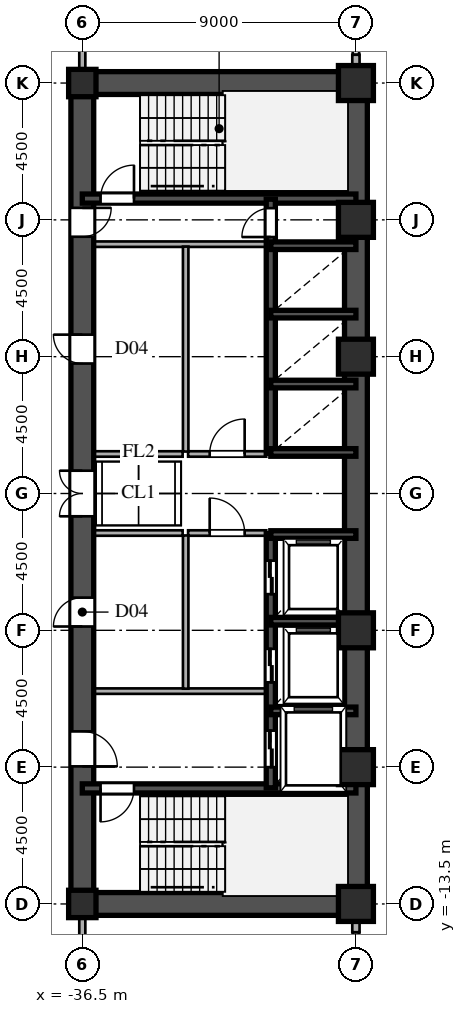
"""IFC4 building model, lengths in metres.
Left out: names, types, materials, properties, quantities, classifications, styles, units other than length and angle.
Written with IfcOpenShell. Run it as: python <this file> out.ifc"""

import sys

from ifc_helpers import new_model, si_unit, direction, frame, frame_2d, origin, origin_2d, place, context, subcontext, project, spatial, rectangle, hollow_rectangle, i_section, extrude, source, transform, mapped, element, fill, save


model = new_model("IFC4")
c1 = context("Model", 3, precision=1e-05, world=origin(), true_north=direction((0.0, 1.0)))
c2 = subcontext(c1, "Body", "Model", "MODEL_VIEW")
j1 = project(units=[si_unit("LENGTHUNIT", "METRE"), si_unit("PLANEANGLEUNIT", "RADIAN")], contexts=[c1])
p1 = place(None, origin())
s1 = spatial("IfcSite", under=j1, at=p1, CompositionType="ELEMENT")
p2 = place(p1, origin())
s2 = spatial("IfcBuilding", under=s1, at=p2, CompositionType="ELEMENT")
p3 = place(p2, frame((0.0, 0.0, 22.5)))
s3 = spatial("IfcBuildingStorey", under=s2, at=p3, CompositionType="ELEMENT", Elevation=22.5)
m1 = source(origin(), c2, "Body", "SweptSolid", [
    extrude(hollow_rectangle(XDim=1.15, YDim=1.15, WallThickness=0.048, at=origin_2d()), origin(), (0.0, 0.0, 1.0), 3.6),
])
for number, where, z_axis, x_axis in (
    (1, (-27.5, -13.5, 0.0), (0.0, 0.0, 1.0), (1.0, 0.0, 0.0)),
    (2, (-27.5, -9.0, 0.0), (0.0, 0.0, 1.0), (1.0, 0.0, 0.0)),
    (3, (-27.5, -4.5, 0.0), (0.0, 0.0, 1.0), (1.0, 0.0, 0.0)),
    (4, (-27.5, 4.5, 0.0), (0.0, 0.0, 1.0), (1.0, 0.0, 0.0)),
    (5, (-27.5, 9.0, 0.0), (0.0, 0.0, 1.0), (1.0, 0.0, 0.0)),
    (6, (-27.5, 13.5, 0.0), (0.0, 0.0, 1.0), (1.0, 0.0, 0.0)),
):
    element("IfcColumn", number, at=place(p3, frame(where, z_axis=z_axis, x_axis=x_axis)), inside=s3, PredefinedType="COLUMN", context=c2, shape_type="MappedRepresentation", body=[
        mapped(m1, transform((0.0, 0.0, 0.0), scale=1.0)),
    ])
m2 = source(origin(), c2, "Body", "SweptSolid", [
    extrude(i_section(OverallWidth=0.9, OverallDepth=0.9, WebThickness=0.036, FlangeThickness=0.055, at=origin_2d()), origin(), (0.0, 0.0, 1.0), 3.6),
])
for number, where, z_axis, x_axis in (
    (7, (-36.5, -13.5, 0.0), (0.0, 0.0, 1.0), (1.0, 0.0, 0.0)),
    (8, (-36.5, 13.5, 0.0), (0.0, 0.0, 1.0), (1.0, 0.0, 0.0)),
):
    element("IfcColumn", number, at=place(p3, frame(where, z_axis=z_axis, x_axis=x_axis)), inside=s3, PredefinedType="COLUMN", context=c2, shape_type="MappedRepresentation", body=[
        mapped(m2, transform((0.0, 0.0, 0.0), scale=1.0)),
    ])
for number, where, z_axis, x_axis in (
    (9, (-27.5, -14.43, 0.0), (0.0, 0.0, 1.0), (0.0, 1.0, 0.0)),
    (10, (-27.5, 13.88, 0.0), (0.0, 0.0, 1.0), (0.0, 1.0, 0.0)),
):
    element("IfcWall", number, at=place(p3, frame(where, z_axis=z_axis, x_axis=x_axis)), inside=s3, PredefinedType="SOLIDWALL", context=c2, shape_type="SweptSolid", body=[
        extrude(rectangle(XDim=0.55, YDim=0.24, at=frame_2d((0.275, 0.0))), origin(), (0.0, 0.0, 1.0), 2.88),
    ])
for number, where, z_axis, x_axis in (
    (11, (-27.5, -13.5, 0.0), (0.0, 0.0, 1.0), (0.0, 1.0, 0.0)),
    (12, (-27.5, 1.3, 0.0), (0.0, 0.0, 1.0), (0.0, 1.0, 0.0)),
):
    element("IfcWall", number, at=place(p3, frame(where, z_axis=z_axis, x_axis=x_axis)), inside=s3, PredefinedType="SHEAR", context=c2, shape_type="SweptSolid", body=[
        extrude(rectangle(XDim=12.2, YDim=0.75, at=frame_2d((6.1, 0.0))), origin(), (0.0, 0.0, 1.0), 3.38),
    ])
p4 = place(p3, frame((-27.5, -1.3, 0.0), z_axis=(0.0, 0.0, 1.0), x_axis=(0.0, 1.0, 0.0)))
e13 = element("IfcWall", 13, at=p4, inside=s3, PredefinedType="SHEAR", context=c2, shape_type="SweptSolid", body=[
    extrude(rectangle(XDim=2.6, YDim=0.75, at=frame_2d((1.3, 0.0))), origin(), (0.0, 0.0, 1.0), 3.38),
])
for number, where, z_axis, x_axis in (
    (14, (-36.5, -13.5, 0.0), (0.0, 0.0, 1.0), (1.0, 0.0, 0.0)),
    (15, (-36.5, 13.5, 0.0), (0.0, 0.0, 1.0), (1.0, 0.0, 0.0)),
):
    element("IfcWall", number, at=place(p3, frame(where, z_axis=z_axis, x_axis=x_axis)), inside=s3, PredefinedType="SHEAR", context=c2, shape_type="SweptSolid", body=[
        extrude(rectangle(XDim=9.0, YDim=0.75, at=frame_2d((4.5, 0.0))), origin(), (0.0, 0.0, 1.0), 3.38),
    ])
p5 = place(p3, frame((-36.5, -13.65, 0.0), z_axis=(0.0, 0.0, 1.0), x_axis=(0.0, 1.0, 0.0)))
e16 = element("IfcWall", 16, at=p5, inside=s3, PredefinedType="SHEAR", context=c2, shape_type="SweptSolid", body=[
    extrude(rectangle(XDim=7.15, YDim=0.75, at=frame_2d((3.575, 0.0))), origin(), (0.0, 0.0, 1.0), 3.38),
])
p6 = place(p5, frame((4.675, 0.0, 0.0)))
e17 = element("IfcOpeningElement", 17, at=p6, cuts=e16, PredefinedType="OPENING", context=c2, shape_type="SweptSolid", body=[
    extrude(rectangle(XDim=1.15, YDim=2.2, at=frame_2d((0.575, 1.1))), frame((0.0, 0.385, 0.0), z_axis=(0.0, -1.0, 0.0), x_axis=(1.0, 0.0, 0.0)), (0.0, 0.0, 1.0), 0.77),
])
p7 = place(p3, frame((-36.5, -1.3, 0.0), z_axis=(0.0, 0.0, 1.0), x_axis=(0.0, 1.0, 0.0)))
e18 = element("IfcWall", 18, at=p7, inside=s3, PredefinedType="SHEAR", context=c2, shape_type="SweptSolid", body=[
    extrude(rectangle(XDim=2.6, YDim=0.75, at=frame_2d((1.3, 0.0))), origin(), (0.0, 0.0, 1.0), 3.38),
])
p8 = place(p7, frame((0.55, 0.0, 0.0)))
e19 = element("IfcOpeningElement", 19, at=p8, cuts=e18, PredefinedType="OPENING", context=c2, shape_type="SweptSolid", body=[
    extrude(rectangle(XDim=1.5, YDim=2.3, at=frame_2d((0.75, 1.15))), frame((0.0, 0.385, 0.0), z_axis=(0.0, -1.0, 0.0), x_axis=(1.0, 0.0, 0.0)), (0.0, 0.0, 1.0), 0.77),
])
p9 = place(p3, frame((-36.5, 8.2, 0.0), z_axis=(0.0, 0.0, 1.0), x_axis=(0.0, 1.0, 0.0)))
e20 = element("IfcWall", 20, at=p9, inside=s3, PredefinedType="SHEAR", context=c2, shape_type="SweptSolid", body=[
    extrude(rectangle(XDim=5.45, YDim=0.75, at=frame_2d((2.725, 0.0))), origin(), (0.0, 0.0, 1.0), 3.38),
])
p10 = place(p9, frame((0.245, 0.0, 0.0)))
e21 = element("IfcOpeningElement", 21, at=p10, cuts=e20, PredefinedType="OPENING", context=c2, shape_type="SweptSolid", body=[
    extrude(rectangle(XDim=0.95, YDim=2.15, at=frame_2d((0.475, 1.075))), frame((0.0, 0.385, 0.0), z_axis=(0.0, -1.0, 0.0), x_axis=(1.0, 0.0, 0.0)), (0.0, 0.0, 1.0), 0.77),
])
p11 = place(p3, frame((-36.5, -6.5, 0.0), z_axis=(0.0, 0.0, 1.0), x_axis=(0.0, 1.0, 0.0)))
e22 = element("IfcWall", 22, at=p11, inside=s3, PredefinedType="SHEAR", context=c2, shape_type="SweptSolid", body=[
    extrude(rectangle(XDim=5.2, YDim=0.75, at=frame_2d((2.6, 0.0))), origin(), (0.0, 0.0, 1.0), 3.38),
])
p12 = place(p11, frame((2.125, 0.0, 0.0)))
e23 = element("IfcOpeningElement", 23, at=p12, cuts=e22, PredefinedType="OPENING", context=c2, shape_type="SweptSolid", body=[
    extrude(rectangle(XDim=0.95, YDim=2.15, at=frame_2d((0.475, 1.075))), frame((0.0, 0.385, 0.0), z_axis=(0.0, -1.0, 0.0), x_axis=(1.0, 0.0, 0.0)), (0.0, 0.0, 1.0), 0.77),
])
p13 = place(p3, frame((-36.5, 1.3, 0.0), z_axis=(0.0, 0.0, 1.0), x_axis=(0.0, 1.0, 0.0)))
e24 = element("IfcWall", 24, at=p13, inside=s3, PredefinedType="SHEAR", context=c2, shape_type="SweptSolid", body=[
    extrude(rectangle(XDim=6.9, YDim=0.75, at=frame_2d((3.45, 0.0))), origin(), (0.0, 0.0, 1.0), 3.38),
])
p14 = place(p13, frame((2.975, 0.0, 0.0)))
e25 = element("IfcOpeningElement", 25, at=p14, cuts=e24, PredefinedType="OPENING", context=c2, shape_type="SweptSolid", body=[
    extrude(rectangle(XDim=0.95, YDim=2.15, at=frame_2d((0.475, 1.075))), frame((0.0, 0.385, 0.0), z_axis=(0.0, -1.0, 0.0), x_axis=(1.0, 0.0, 0.0)), (0.0, 0.0, 1.0), 0.77),
])
p15 = place(p3, frame((-36.5, -9.7, 0.0), z_axis=(0.0, 0.0, 1.0), x_axis=(1.0, 0.0, 0.0)))
e26 = element("IfcWall", 26, at=p15, inside=s3, PredefinedType="SHEAR", context=c2, shape_type="SweptSolid", body=[
    extrude(rectangle(XDim=9.0, YDim=0.3, at=frame_2d((4.5, 0.0))), origin(), (0.0, 0.0, 1.0), 3.38),
])
p16 = place(p15, frame((0.6, 0.0, 0.0)))
e27 = element("IfcOpeningElement", 27, at=p16, cuts=e26, PredefinedType="OPENING", context=c2, shape_type="SweptSolid", body=[
    extrude(rectangle(XDim=1.1, YDim=2.2, at=frame_2d((0.55, 1.1))), frame((0.0, 0.16, 0.0), z_axis=(0.0, -1.0, 0.0), x_axis=(1.0, 0.0, 0.0)), (0.0, 0.0, 1.0), 0.32),
])
p17 = place(p3, frame((-36.5, 9.7, 0.0), z_axis=(0.0, 0.0, 1.0), x_axis=(1.0, 0.0, 0.0)))
e28 = element("IfcWall", 28, at=p17, inside=s3, PredefinedType="SHEAR", context=c2, shape_type="SweptSolid", body=[
    extrude(rectangle(XDim=9.0, YDim=0.3, at=frame_2d((4.5, 0.0))), origin(), (0.0, 0.0, 1.0), 3.38),
])
p18 = place(p17, frame((0.6, 0.0, 0.0)))
e29 = element("IfcOpeningElement", 29, at=p18, cuts=e28, PredefinedType="OPENING", context=c2, shape_type="SweptSolid", body=[
    extrude(rectangle(XDim=1.1, YDim=2.2, at=frame_2d((0.55, 1.1))), frame((0.0, 0.16, 0.0), z_axis=(0.0, -1.0, 0.0), x_axis=(1.0, 0.0, 0.0)), (0.0, 0.0, 1.0), 0.32),
])
for number, where, z_axis, x_axis in (
    (30, (-30.3, -7.15, 0.0), (0.0, 0.0, 1.0), (1.0, 0.0, 0.0)),
    (31, (-30.3, -4.2, 0.0), (0.0, 0.0, 1.0), (1.0, 0.0, 0.0)),
    (32, (-30.3, -1.35, 0.0), (0.0, 0.0, 1.0), (1.0, 0.0, 0.0)),
    (33, (-30.3, 1.35, 0.0), (0.0, 0.0, 1.0), (1.0, 0.0, 0.0)),
    (34, (-30.3, 3.6, 0.0), (0.0, 0.0, 1.0), (1.0, 0.0, 0.0)),
    (35, (-30.3, 5.9, 0.0), (0.0, 0.0, 1.0), (1.0, 0.0, 0.0)),
    (36, (-30.3, 8.15, 0.0), (0.0, 0.0, 1.0), (1.0, 0.0, 0.0)),
):
    element("IfcWall", number, at=place(p3, frame(where, z_axis=z_axis, x_axis=x_axis)), inside=s3, PredefinedType="SHEAR", context=c2, shape_type="SweptSolid", body=[
        extrude(rectangle(XDim=2.8, YDim=0.25, at=frame_2d((1.4, 0.0))), origin(), (0.0, 0.0, 1.0), 3.38),
    ])
p19 = place(p3, frame((-30.3, -9.68, 0.0), z_axis=(0.0, 0.0, 1.0), x_axis=(0.0, 1.0, 0.0)))
e37 = element("IfcWall", 37, at=p19, inside=s3, PredefinedType="SHEAR", context=c2, shape_type="SweptSolid", body=[
    extrude(rectangle(XDim=2.56, YDim=0.3, at=frame_2d((1.28, 0.0))), origin(), (0.0, 0.0, 1.0), 3.38),
])
p20 = place(p19, frame((0.68, 0.0, 0.0)))
e38 = element("IfcOpeningElement", 38, at=p20, cuts=e37, PredefinedType="OPENING", context=c2, shape_type="SweptSolid", body=[
    extrude(rectangle(XDim=1.2, YDim=2.25, at=frame_2d((0.6, 1.125))), frame((0.0, 0.16, 0.0), z_axis=(0.0, -1.0, 0.0), x_axis=(1.0, 0.0, 0.0)), (0.0, 0.0, 1.0), 0.32),
])
p21 = place(p3, frame((-30.3, -7.12, 0.0), z_axis=(0.0, 0.0, 1.0), x_axis=(0.0, 1.0, 0.0)))
e39 = element("IfcWall", 39, at=p21, inside=s3, PredefinedType="SHEAR", context=c2, shape_type="SweptSolid", body=[
    extrude(rectangle(XDim=2.92, YDim=0.3, at=frame_2d((1.46, 0.0))), origin(), (0.0, 0.0, 1.0), 3.38),
])
p22 = place(p21, frame((0.91, 0.0, 0.0)))
e40 = element("IfcOpeningElement", 40, at=p22, cuts=e39, PredefinedType="OPENING", context=c2, shape_type="SweptSolid", body=[
    extrude(rectangle(XDim=1.1, YDim=2.2, at=frame_2d((0.55, 1.1))), frame((0.0, 0.16, 0.0), z_axis=(0.0, -1.0, 0.0), x_axis=(1.0, 0.0, 0.0)), (0.0, 0.0, 1.0), 0.32),
])
p23 = place(p3, frame((-30.3, -4.2, 0.0), z_axis=(0.0, 0.0, 1.0), x_axis=(0.0, 1.0, 0.0)))
e41 = element("IfcWall", 41, at=p23, inside=s3, PredefinedType="SHEAR", context=c2, shape_type="SweptSolid", body=[
    extrude(rectangle(XDim=2.88, YDim=0.3, at=frame_2d((1.44, 0.0))), origin(), (0.0, 0.0, 1.0), 3.38),
])
p24 = place(p23, frame((0.89, 0.0, 0.0)))
e42 = element("IfcOpeningElement", 42, at=p24, cuts=e41, PredefinedType="OPENING", context=c2, shape_type="SweptSolid", body=[
    extrude(rectangle(XDim=1.1, YDim=2.2, at=frame_2d((0.55, 1.1))), frame((0.0, 0.16, 0.0), z_axis=(0.0, -1.0, 0.0), x_axis=(1.0, 0.0, 0.0)), (0.0, 0.0, 1.0), 0.32),
])
p25 = place(p3, frame((-30.3, 1.32, 0.0), z_axis=(0.0, 0.0, 1.0), x_axis=(0.0, 1.0, 0.0)))
e43 = element("IfcWall", 43, at=p25, inside=s3, PredefinedType="SHEAR", context=c2, shape_type="SweptSolid", body=[
    extrude(rectangle(XDim=2.28, YDim=0.3, at=frame_2d((1.14, 0.0))), origin(), (0.0, 0.0, 1.0), 3.38),
])
p26 = place(p3, frame((-30.3, 3.6, 0.0), z_axis=(0.0, 0.0, 1.0), x_axis=(0.0, 1.0, 0.0)))
e44 = element("IfcWall", 44, at=p26, inside=s3, PredefinedType="SHEAR", context=c2, shape_type="SweptSolid", body=[
    extrude(rectangle(XDim=2.3, YDim=0.3, at=frame_2d((1.15, 0.0))), origin(), (0.0, 0.0, 1.0), 3.38),
])
p27 = place(p3, frame((-30.3, 5.9, 0.0), z_axis=(0.0, 0.0, 1.0), x_axis=(0.0, 1.0, 0.0)))
e45 = element("IfcWall", 45, at=p27, inside=s3, PredefinedType="SHEAR", context=c2, shape_type="SweptSolid", body=[
    extrude(rectangle(XDim=2.25, YDim=0.3, at=frame_2d((1.125, 0.0))), origin(), (0.0, 0.0, 1.0), 3.38),
])
p28 = place(p3, frame((-30.3, 8.15, 0.0), z_axis=(0.0, 0.0, 1.0), x_axis=(0.0, 1.0, 0.0)))
e46 = element("IfcWall", 46, at=p28, inside=s3, PredefinedType="SHEAR", context=c2, shape_type="SweptSolid", body=[
    extrude(rectangle(XDim=1.53, YDim=0.3, at=frame_2d((0.765, 0.0))), origin(), (0.0, 0.0, 1.0), 3.38),
])
p29 = place(p28, frame((0.285, 0.0, 0.0)))
e47 = element("IfcOpeningElement", 47, at=p29, cuts=e46, PredefinedType="OPENING", context=c2, shape_type="SweptSolid", body=[
    extrude(rectangle(XDim=0.95, YDim=2.15, at=frame_2d((0.475, 1.075))), frame((0.0, 0.16, 0.0), z_axis=(0.0, -1.0, 0.0), x_axis=(1.0, 0.0, 0.0)), (0.0, 0.0, 1.0), 0.32),
])
for number, where, z_axis, x_axis in (
    (48, (-36.15, -6.5, 0.0), (0.0, 0.0, 1.0), (1.0, 0.0, 0.0)),
    (49, (-36.15, 8.2, 0.0), (0.0, 0.0, 1.0), (1.0, 0.0, 0.0)),
):
    element("IfcWall", number, at=place(p3, frame(where, z_axis=z_axis, x_axis=x_axis)), inside=s3, PredefinedType="PARTITIONING", context=c2, shape_type="SweptSolid", body=[
        extrude(rectangle(XDim=5.7, YDim=0.18, at=frame_2d((2.85, 0.0))), origin(), (0.0, 0.0, 1.0), 3.38),
    ])
p30 = place(p3, frame((-33.1, -6.42, 0.0), z_axis=(0.0, 0.0, 1.0), x_axis=(0.0, 1.0, 0.0)))
e50 = element("IfcWall", 50, at=p30, inside=s3, PredefinedType="PARTITIONING", context=c2, shape_type="SweptSolid", body=[
    extrude(rectangle(XDim=5.04, YDim=0.18, at=frame_2d((2.52, 0.0))), origin(), (0.0, 0.0, 1.0), 3.38),
])
p31 = place(p3, frame((-33.1, 1.38, 0.0), z_axis=(0.0, 0.0, 1.0), x_axis=(0.0, 1.0, 0.0)))
e51 = element("IfcWall", 51, at=p31, inside=s3, PredefinedType="PARTITIONING", context=c2, shape_type="SweptSolid", body=[
    extrude(rectangle(XDim=6.74, YDim=0.18, at=frame_2d((3.37, 0.0))), origin(), (0.0, 0.0, 1.0), 3.38),
])
p32 = place(p3, frame((-33.02, -1.3, 0.0), z_axis=(0.0, 0.0, 1.0), x_axis=(1.0, 0.0, 0.0)))
e52 = element("IfcWall", 52, at=p32, inside=s3, PredefinedType="PARTITIONING", context=c2, shape_type="SweptSolid", body=[
    extrude(rectangle(XDim=2.57, YDim=0.18, at=frame_2d((1.285, 0.0))), origin(), (0.0, 0.0, 1.0), 3.38),
])
p33 = place(p32, frame((0.71, 0.0, 0.0)))
e53 = element("IfcOpeningElement", 53, at=p33, cuts=e52, PredefinedType="OPENING", context=c2, shape_type="SweptSolid", body=[
    extrude(rectangle(XDim=1.15, YDim=2.2, at=frame_2d((0.575, 1.1))), frame((0.0, 0.1, 0.0), z_axis=(0.0, -1.0, 0.0), x_axis=(1.0, 0.0, 0.0)), (0.0, 0.0, 1.0), 0.2),
])
p34 = place(p3, frame((-33.02, 1.3, 0.0), z_axis=(0.0, 0.0, 1.0), x_axis=(1.0, 0.0, 0.0)))
e54 = element("IfcWall", 54, at=p34, inside=s3, PredefinedType="PARTITIONING", context=c2, shape_type="SweptSolid", body=[
    extrude(rectangle(XDim=2.57, YDim=0.18, at=frame_2d((1.285, 0.0))), origin(), (0.0, 0.0, 1.0), 3.38),
])
p35 = place(p34, frame((0.71, 0.0, 0.0)))
e55 = element("IfcOpeningElement", 55, at=p35, cuts=e54, PredefinedType="OPENING", context=c2, shape_type="SweptSolid", body=[
    extrude(rectangle(XDim=1.15, YDim=2.2, at=frame_2d((0.575, 1.1))), frame((0.0, 0.1, 0.0), z_axis=(0.0, -1.0, 0.0), x_axis=(1.0, 0.0, 0.0)), (0.0, 0.0, 1.0), 0.2),
])
for number, where, z_axis, x_axis in (
    (56, (-36.15, -1.3, 0.0), (0.0, 0.0, 1.0), (1.0, 0.0, 0.0)),
    (57, (-36.15, 1.3, 0.0), (0.0, 0.0, 1.0), (1.0, 0.0, 0.0)),
):
    element("IfcWall", number, at=place(p3, frame(where, z_axis=z_axis, x_axis=x_axis)), inside=s3, PredefinedType="PARTITIONING", context=c2, shape_type="SweptSolid", body=[
        extrude(rectangle(XDim=2.95, YDim=0.18, at=frame_2d((1.475, 0.0))), origin(), (0.0, 0.0, 1.0), 3.38),
    ])
for number, where, z_axis, x_axis in (
    (58, (-36.5, -15.515, 0.0), (0.0, 0.0, 1.0), (0.0, 1.0, 0.0)),
    (59, (-36.5, 13.88, 0.0), (0.0, 0.0, 1.0), (0.0, 1.0, 0.0)),
):
    element("IfcWall", number, at=place(p3, frame(where, z_axis=z_axis, x_axis=x_axis)), inside=s3, PredefinedType="PARTITIONING", context=c2, shape_type="SweptSolid", body=[
        extrude(rectangle(XDim=1.635, YDim=0.2, at=frame_2d((0.817, 0.0))), origin(), (0.0, 0.0, 1.0), 2.68),
    ])
m3 = source(origin(), c2, "Body", "SweptSolid", [
    extrude(rectangle(XDim=1.15, YDim=2.2, at=frame_2d((0.575, 1.1))), frame((0.0, 0.025, 0.0), z_axis=(0.0, -1.0, 0.0), x_axis=(1.0, 0.0, 0.0)), (0.0, 0.0, 1.0), 0.05),
])
p36 = place(p6, frame((1.15, 0.0, 0.0), z_axis=(0.0, 0.0, 1.0), x_axis=(-1.0, 0.0, 0.0)))
e60 = element("IfcDoor", 60, at=p36, inside=s3, OperationType="SINGLE_SWING_LEFT", PredefinedType="DOOR", context=c2, shape_type="MappedRepresentation", body=[
    mapped(m3, transform((0.0, 0.0, 0.0), scale=1.0)),
])
fill(e17, e60)
m4 = source(origin(), c2, "Body", "SweptSolid", [
    extrude(rectangle(XDim=1.5, YDim=2.3, at=frame_2d((0.75, 1.15))), frame((0.0, 0.025, 0.0), z_axis=(0.0, -1.0, 0.0), x_axis=(1.0, 0.0, 0.0)), (0.0, 0.0, 1.0), 0.05),
])
p37 = place(p8, origin())
e61 = element("IfcDoor", 61, at=p37, inside=s3, OperationType="DOUBLE_SWING_LEFT", PredefinedType="DOOR", context=c2, shape_type="MappedRepresentation", body=[
    mapped(m4, transform((0.0, 0.0, 0.0), scale=1.0)),
])
fill(e19, e61)
m5 = source(origin(), c2, "Body", "SweptSolid", [
    extrude(rectangle(XDim=0.95, YDim=2.15, at=frame_2d((0.475, 1.075))), frame((0.0, 0.025, 0.0), z_axis=(0.0, -1.0, 0.0), x_axis=(1.0, 0.0, 0.0)), (0.0, 0.0, 1.0), 0.05),
])
p38 = place(p10, frame((0.95, 0.0, 0.0), z_axis=(0.0, 0.0, 1.0), x_axis=(-1.0, 0.0, 0.0)))
e62 = element("IfcDoor", 62, at=p38, inside=s3, OperationType="SINGLE_SWING_RIGHT", PredefinedType="DOOR", context=c2, shape_type="MappedRepresentation", body=[
    mapped(m5, transform((0.0, 0.0, 0.0), scale=1.0)),
])
fill(e21, e62)
p39 = place(p12, origin())
e63 = element("IfcDoor", 63, at=p39, inside=s3, OperationType="SINGLE_SWING_LEFT", PredefinedType="DOOR", context=c2, shape_type="MappedRepresentation", body=[
    mapped(m5, transform((0.0, 0.0, 0.0), scale=1.0)),
])
fill(e23, e63)
p40 = place(p14, origin())
e64 = element("IfcDoor", 64, at=p40, inside=s3, OperationType="SINGLE_SWING_RIGHT", PredefinedType="DOOR", context=c2, shape_type="MappedRepresentation", body=[
    mapped(m5, transform((0.0, 0.0, 0.0), scale=1.0)),
])
fill(e25, e64)
m6 = source(origin(), c2, "Body", "SweptSolid", [
    extrude(rectangle(XDim=1.1, YDim=2.2, at=frame_2d((0.55, 1.1))), frame((0.0, 0.025, 0.0), z_axis=(0.0, -1.0, 0.0), x_axis=(1.0, 0.0, 0.0)), (0.0, 0.0, 1.0), 0.05),
])
p41 = place(p16, frame((1.1, 0.0, 0.0), z_axis=(0.0, 0.0, 1.0), x_axis=(-1.0, 0.0, 0.0)))
e65 = element("IfcDoor", 65, at=p41, inside=s3, OperationType="SINGLE_SWING_LEFT", PredefinedType="DOOR", context=c2, shape_type="MappedRepresentation", body=[
    mapped(m6, transform((0.0, 0.0, 0.0), scale=1.0)),
])
fill(e27, e65)
p42 = place(p18, origin())
e66 = element("IfcDoor", 66, at=p42, inside=s3, OperationType="SINGLE_SWING_RIGHT", PredefinedType="DOOR", context=c2, shape_type="MappedRepresentation", body=[
    mapped(m6, transform((0.0, 0.0, 0.0), scale=1.0)),
])
fill(e29, e66)
m7 = source(origin(), c2, "Body", "SweptSolid", [
    extrude(rectangle(XDim=1.2, YDim=2.25, at=frame_2d((0.6, 1.125))), frame((0.0, 0.025, 0.0), z_axis=(0.0, -1.0, 0.0), x_axis=(1.0, 0.0, 0.0)), (0.0, 0.0, 1.0), 0.05),
])
p43 = place(p20, origin())
e67 = element("IfcDoor", 67, at=p43, inside=s3, OperationType="DOUBLE_DOOR_SLIDING", PredefinedType="DOOR", context=c2, shape_type="MappedRepresentation", body=[
    mapped(m7, transform((0.0, 0.0, 0.0), scale=1.0)),
])
fill(e38, e67)
m8 = source(origin(), c2, "Body", "SweptSolid", [
    extrude(rectangle(XDim=1.1, YDim=2.2, at=frame_2d((0.55, 1.1))), frame((0.0, 0.025, 0.0), z_axis=(0.0, -1.0, 0.0), x_axis=(1.0, 0.0, 0.0)), (0.0, 0.0, 1.0), 0.05),
])
p44 = place(p22, origin())
e68 = element("IfcDoor", 68, at=p44, inside=s3, OperationType="DOUBLE_DOOR_SLIDING", PredefinedType="DOOR", context=c2, shape_type="MappedRepresentation", body=[
    mapped(m8, transform((0.0, 0.0, 0.0), scale=1.0)),
])
fill(e40, e68)
p45 = place(p24, origin())
e69 = element("IfcDoor", 69, at=p45, inside=s3, OperationType="DOUBLE_DOOR_SLIDING", PredefinedType="DOOR", context=c2, shape_type="MappedRepresentation", body=[
    mapped(m8, transform((0.0, 0.0, 0.0), scale=1.0)),
])
fill(e42, e69)
p46 = place(p29, origin())
e70 = element("IfcDoor", 70, at=p46, inside=s3, OperationType="SINGLE_SWING_LEFT", PredefinedType="DOOR", context=c2, shape_type="MappedRepresentation", body=[
    mapped(m5, transform((0.0, 0.0, 0.0), scale=1.0)),
])
fill(e47, e70)
p47 = place(p33, origin())
e71 = element("IfcDoor", 71, at=p47, inside=s3, OperationType="SINGLE_SWING_LEFT", PredefinedType="DOOR", context=c2, shape_type="MappedRepresentation", body=[
    mapped(m3, transform((0.0, 0.0, 0.0), scale=1.0)),
])
fill(e53, e71)
p48 = place(p35, origin())
e72 = element("IfcDoor", 72, at=p48, inside=s3, OperationType="SINGLE_SWING_RIGHT", PredefinedType="DOOR", context=c2, shape_type="MappedRepresentation", body=[
    mapped(m3, transform((0.0, 0.0, 0.0), scale=1.0)),
])
fill(e55, e72)
save(model, sys.argv[1])
